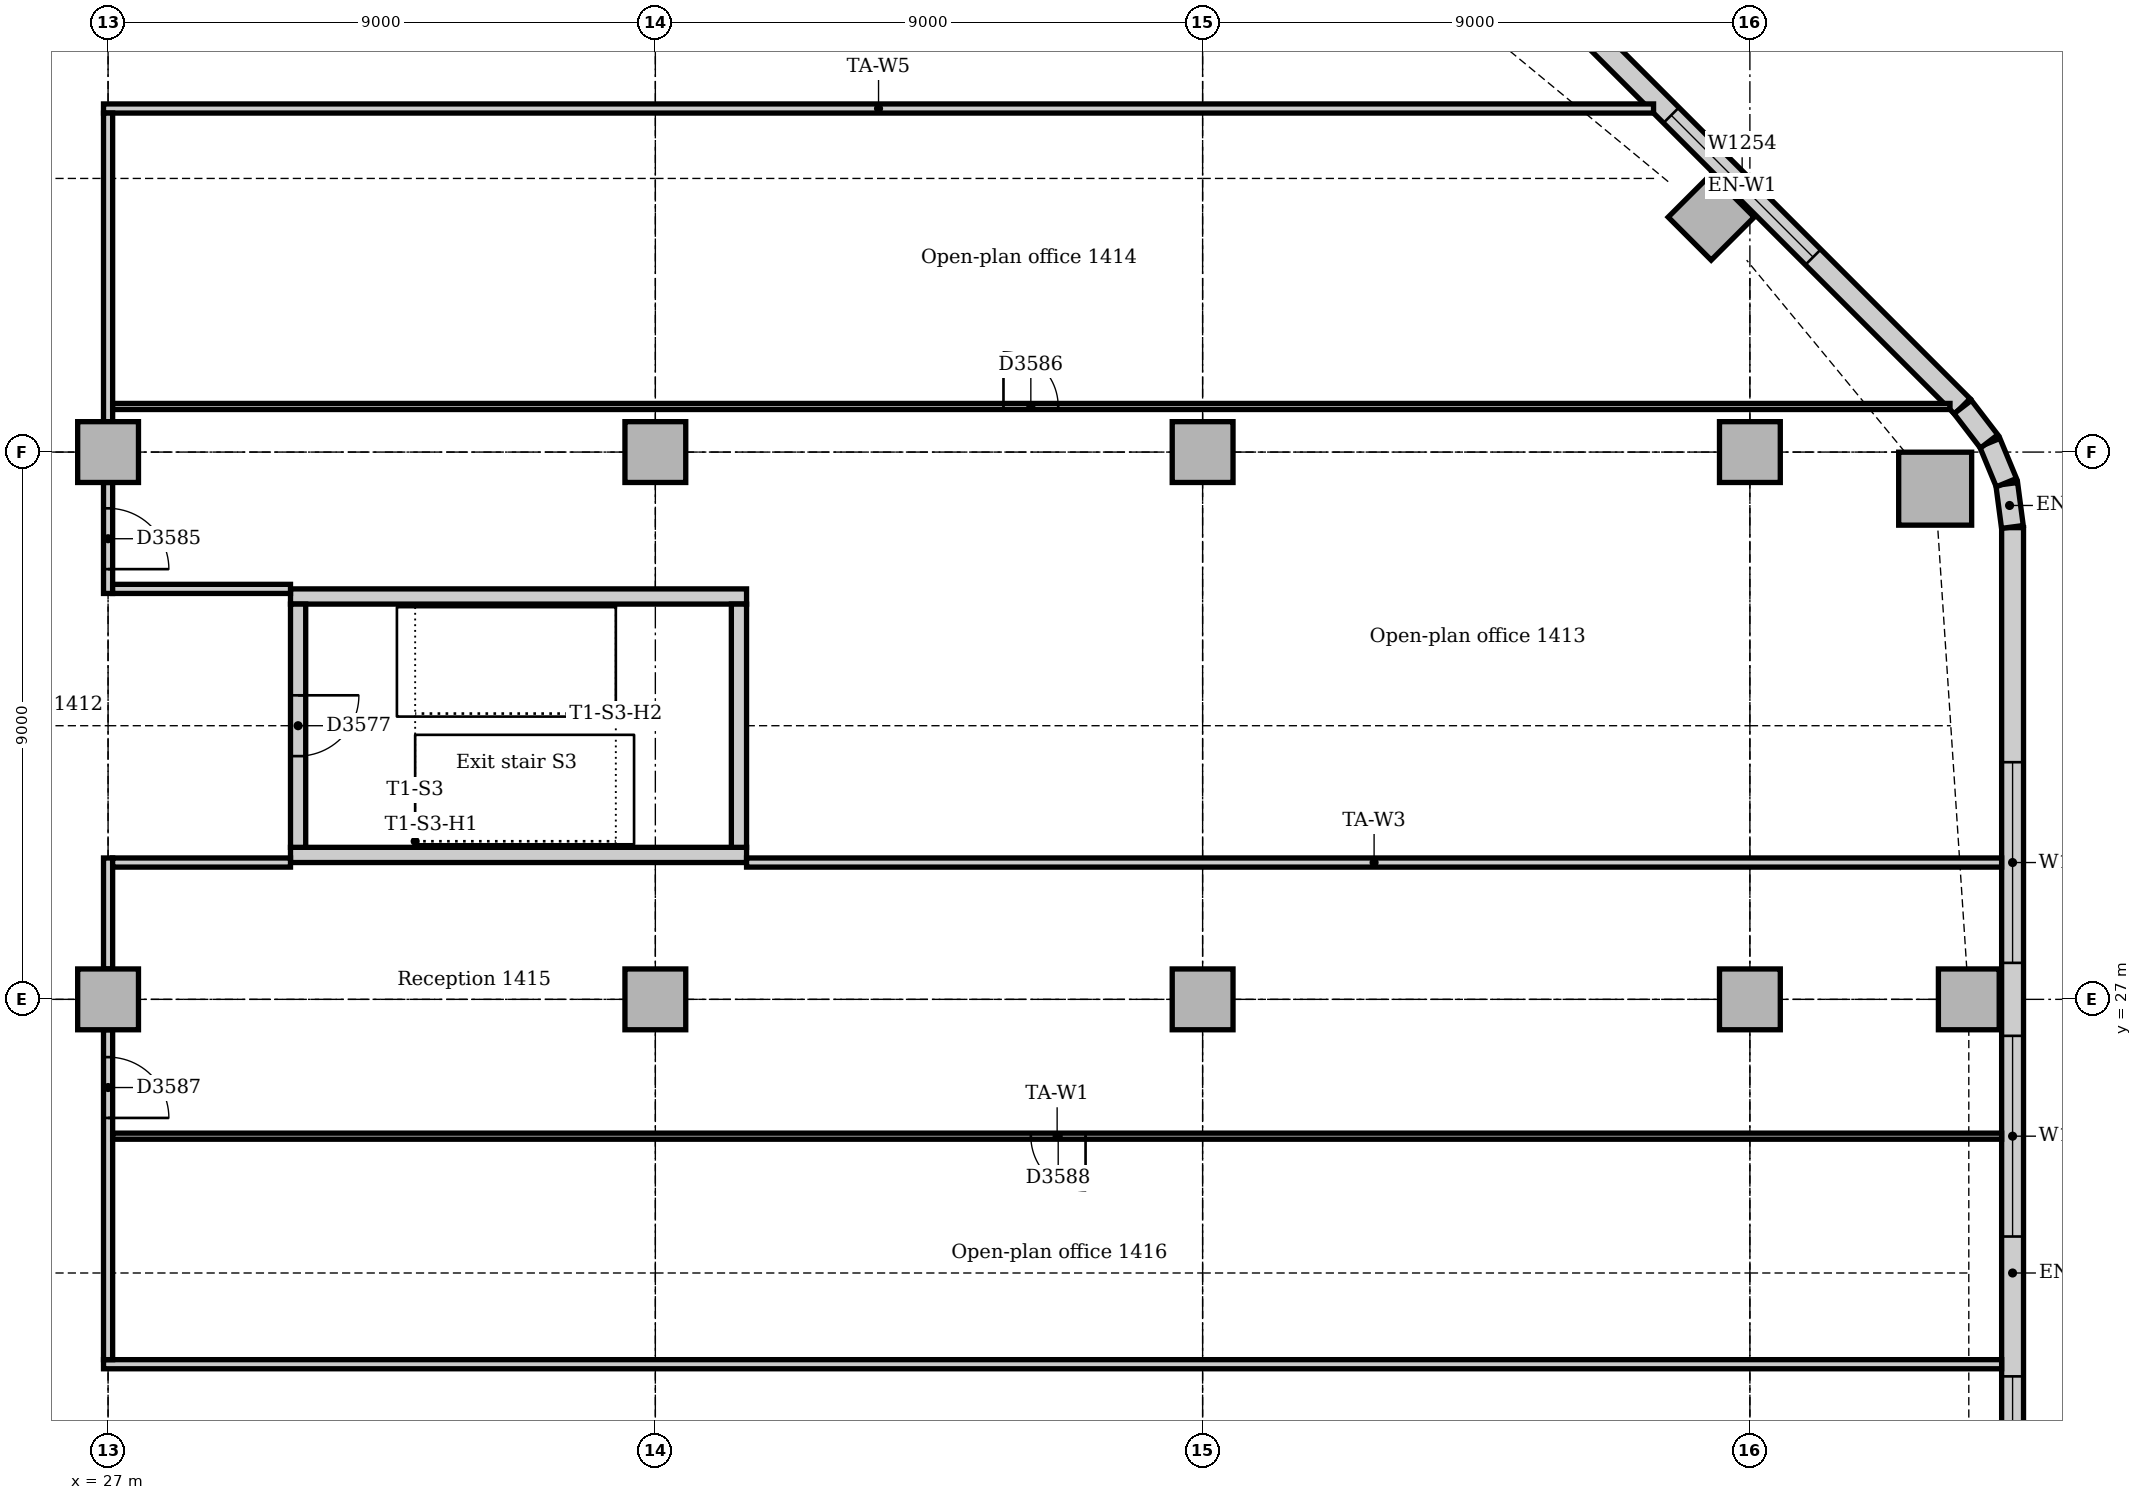
"""IFC4 building model, lengths in metres.
Left out: names, types, materials, properties, quantities, classifications, styles, units other than length and angle.
Written with IfcOpenShell. Run it as: python <this file> out.ifc"""

import sys

from ifc_helpers import new_model, si_unit, direction, frame, frame_2d, origin, origin_2d, place, context, subcontext, project, spatial, rectangle, extrude, element, fill, save


model = new_model("IFC4")
c1 = context("Model", 3, precision=1e-05, world=origin(), true_north=direction((0.0, 1.0)))
c2 = subcontext(c1, "Body", "Model", "MODEL_VIEW")
j1 = project(units=[si_unit("LENGTHUNIT", "METRE"), si_unit("PLANEANGLEUNIT", "RADIAN")], contexts=[c1])
p1 = place(None, origin())
s1 = spatial("IfcSite", under=j1, at=p1, CompositionType="ELEMENT")
p2 = place(p1, origin())
s2 = spatial("IfcBuilding", under=s1, at=p2, CompositionType="ELEMENT")
p3 = place(p2, frame((0.0, 0.0, 63.0)))
s3 = spatial("IfcBuildingStorey", under=s2, at=p3, CompositionType="ELEMENT", Elevation=63.0)
for number, where, z_axis, x_axis in (
    (1, (30.0, 29.375, 0.0), (0.0, 0.0, 1.0), (1.0, 0.0, 0.0)),
    (2, (37.5, 33.625, 0.0), (0.0, 0.0, 1.0), (-1.0, 0.0, 0.0)),
):
    element("IfcWall", number, at=place(p3, frame(where, z_axis=z_axis, x_axis=x_axis)), inside=s3, PredefinedType="SOLIDWALL", context=c2, shape_type="SweptSolid", body=[
        extrude(rectangle(XDim=7.5, YDim=0.25, at=frame_2d((3.75, 0.0))), origin(), (0.0, 0.0, 1.0), 4.0),
    ])
p4 = place(p3, frame((37.375, 29.5, 0.0), z_axis=(0.0, 0.0, 1.0), x_axis=(0.0, 1.0, 0.0)))
e3 = element("IfcWall", 3, at=p4, inside=s3, PredefinedType="SOLIDWALL", context=c2, shape_type="SweptSolid", body=[
    extrude(rectangle(XDim=4.0, YDim=0.25, at=frame_2d((2.0, 0.0))), origin(), (0.0, 0.0, 1.0), 4.0),
])
p5 = place(p3, frame((30.125, 33.5, 0.0), z_axis=(0.0, 0.0, 1.0), x_axis=(0.0, -1.0, 0.0)))
e4 = element("IfcWall", 4, at=p5, inside=s3, PredefinedType="SOLIDWALL", context=c2, shape_type="SweptSolid", body=[
    extrude(rectangle(XDim=4.0, YDim=0.25, at=frame_2d((2.0, 0.0))), origin(), (0.0, 0.0, 1.0), 4.0),
])
p6 = place(p5, frame((1.5, 0.0, 0.0)))
e5 = element("IfcOpeningElement", 5, at=p6, cuts=e4, PredefinedType="OPENING", context=c2, shape_type="SweptSolid", body=[
    extrude(rectangle(XDim=1.0, YDim=2.1, at=frame_2d((0.5, 1.05))), frame((0.0, 0.135, 0.0), z_axis=(0.0, -1.0, 0.0), x_axis=(1.0, 0.0, 0.0)), (0.0, 0.0, 1.0), 0.27),
])
p7 = place(p3, frame((57.047, 35.398, 0.0), z_axis=(0.0, 0.0, 1.0), x_axis=(1.0, 0.0, 0.0)))
e6 = element("IfcColumn", 6, at=p7, inside=s3, PredefinedType="COLUMN", context=c2, shape_type="SweptSolid", body=[
    extrude(rectangle(XDim=1.2, YDim=1.2, at=origin_2d()), origin(), (0.0, 0.0, 1.0), 3.85),
])
for number, where, z_axis, x_axis in (
    (7, (57.6, 27.0, 0.0), (0.0, 0.0, 1.0), (1.0, 0.0, 0.0)),
    (8, (53.364, 39.864, 0.0), (0.0, 0.0, 1.0), (0.707, 0.707, 0.0)),
    (9, (27.0, 27.0, 0.0), (0.0, 0.0, 1.0), (1.0, 0.0, 0.0)),
    (10, (27.0, 36.0, 0.0), (0.0, 0.0, 1.0), (1.0, 0.0, 0.0)),
    (11, (36.0, 27.0, 0.0), (0.0, 0.0, 1.0), (1.0, 0.0, 0.0)),
    (12, (36.0, 36.0, 0.0), (0.0, 0.0, 1.0), (1.0, 0.0, 0.0)),
    (13, (45.0, 27.0, 0.0), (0.0, 0.0, 1.0), (1.0, 0.0, 0.0)),
    (14, (45.0, 36.0, 0.0), (0.0, 0.0, 1.0), (1.0, 0.0, 0.0)),
    (15, (54.0, 27.0, 0.0), (0.0, 0.0, 1.0), (1.0, 0.0, 0.0)),
    (16, (54.0, 36.0, 0.0), (0.0, 0.0, 1.0), (1.0, 0.0, 0.0)),
):
    element("IfcColumn", number, at=place(p3, frame(where, z_axis=z_axis, x_axis=x_axis)), inside=s3, PredefinedType="COLUMN", context=c2, shape_type="SweptSolid", body=[
        extrude(rectangle(XDim=1.0, YDim=1.0, at=origin_2d()), origin(), (0.0, 0.0, 1.0), 3.85),
    ])
p8 = place(p3, frame((58.32, 10.243, 0.0), z_axis=(0.0, 0.0, 1.0), x_axis=(0.0, 1.0, 0.0)))
e17 = element("IfcWall", 17, at=p8, inside=s3, PredefinedType="STANDARD", context=c2, shape_type="SweptSolid", body=[
    extrude(rectangle(XDim=24.515, YDim=0.36, at=frame_2d((12.257, 0.0))), origin(), (0.0, 0.0, 1.0), 3.85),
])
p9 = place(p8, frame((3.857, 0.0, 0.9)))
e18 = element("IfcOpeningElement", 18, at=p9, cuts=e17, PredefinedType="OPENING", context=c2, shape_type="SweptSolid", body=[
    extrude(rectangle(XDim=3.3, YDim=1.6, at=frame_2d((1.65, 0.8))), frame((0.0, 0.19, 0.0), z_axis=(0.0, -1.0, 0.0), x_axis=(1.0, 0.0, 0.0)), (0.0, 0.0, 1.0), 0.38),
])
p10 = place(p8, frame((8.757, 0.0, 0.9)))
e19 = element("IfcOpeningElement", 19, at=p10, cuts=e17, PredefinedType="OPENING", context=c2, shape_type="SweptSolid", body=[
    extrude(rectangle(XDim=1.8, YDim=1.6, at=frame_2d((0.9, 0.8))), frame((0.0, 0.19, 0.0), z_axis=(0.0, -1.0, 0.0), x_axis=(1.0, 0.0, 0.0)), (0.0, 0.0, 1.0), 0.38),
])
p11 = place(p8, frame((12.857, 0.0, 0.9)))
e20 = element("IfcOpeningElement", 20, at=p11, cuts=e17, PredefinedType="OPENING", context=c2, shape_type="SweptSolid", body=[
    extrude(rectangle(XDim=3.3, YDim=1.6, at=frame_2d((1.65, 0.8))), frame((0.0, 0.19, 0.0), z_axis=(0.0, -1.0, 0.0), x_axis=(1.0, 0.0, 0.0)), (0.0, 0.0, 1.0), 0.38),
])
p12 = place(p8, frame((17.357, 0.0, 0.9)))
e21 = element("IfcOpeningElement", 21, at=p12, cuts=e17, PredefinedType="OPENING", context=c2, shape_type="SweptSolid", body=[
    extrude(rectangle(XDim=3.3, YDim=1.6, at=frame_2d((1.65, 0.8))), frame((0.0, 0.19, 0.0), z_axis=(0.0, -1.0, 0.0), x_axis=(1.0, 0.0, 0.0)), (0.0, 0.0, 1.0), 0.38),
])
p13 = place(p3, frame((57.494, 36.751, 0.0), z_axis=(0.0, 0.0, 1.0), x_axis=(-0.707106781187, 0.707106781187, 0.0)))
e22 = element("IfcWall", 22, at=p13, inside=s3, PredefinedType="STANDARD", context=c2, shape_type="SweptSolid", body=[
    extrude(rectangle(XDim=10.243, YDim=0.36, at=frame_2d((5.121, 0.0))), origin(), (0.0, 0.0, 1.0), 3.85),
])
p14 = place(p13, frame((3.471, 0.0, 0.9)))
e23 = element("IfcOpeningElement", 23, at=p14, cuts=e22, PredefinedType="OPENING", context=c2, shape_type="SweptSolid", body=[
    extrude(rectangle(XDim=3.3, YDim=1.6, at=frame_2d((1.65, 0.8))), frame((0.0, 0.19, 0.0), z_axis=(0.0, -1.0, 0.0), x_axis=(1.0, 0.0, 0.0)), (0.0, 0.0, 1.0), 0.38),
])
for number, where, z_axis, x_axis in (
    (24, (58.317, 34.769, 0.0), (0.0, 0.0, 1.0), (-0.131, 0.991, 0.0)),
    (25, (58.218, 35.497, 0.0), (0.0, 0.0, 1.0), (-0.383, 0.924, 0.0)),
):
    element("IfcWall", number, at=place(p3, frame(where, z_axis=z_axis, x_axis=x_axis)), inside=s3, PredefinedType="STANDARD", context=c2, shape_type="SweptSolid", body=[
        extrude(rectangle(XDim=0.713, YDim=0.36, at=frame_2d((0.356, 0.0))), origin(), (0.0, 0.0, 1.0), 3.85),
    ])
p15 = place(p3, frame((57.934, 36.175, 0.0), z_axis=(0.0, 0.0, 1.0), x_axis=(-0.608802368033, 0.793321924995, 0.0)))
e26 = element("IfcWall", 26, at=p15, inside=s3, PredefinedType="STANDARD", context=c2, shape_type="SweptSolid", body=[
    extrude(rectangle(XDim=0.713, YDim=0.36, at=frame_2d((0.357, 0.0))), origin(), (0.0, 0.0, 1.0), 3.85),
])
p16 = place(p3, frame((26.925, 21.0, 0.0), z_axis=(0.0, 0.0, 1.0), x_axis=(1.0, 0.0, 0.0)))
e27 = element("IfcWall", 27, at=p16, inside=s3, PredefinedType="PARTITIONING", context=c2, shape_type="SweptSolid", body=[
    extrude(rectangle(XDim=31.215, YDim=0.15, at=frame_2d((15.607, 0.0))), origin(), (0.0, 0.0, 1.0), 3.85),
])
p17 = place(p3, frame((26.925, 41.65, 0.0), z_axis=(0.0, 0.0, 1.0), x_axis=(1.0, 0.0, 0.0)))
e28 = element("IfcWall", 28, at=p17, inside=s3, PredefinedType="PARTITIONING", context=c2, shape_type="SweptSolid", body=[
    extrude(rectangle(XDim=25.491, YDim=0.15, at=frame_2d((12.745, 0.0))), origin(), (0.0, 0.0, 1.0), 3.85),
])
p18 = place(p3, frame((27.0, 21.075, 0.0), z_axis=(0.0, 0.0, 1.0), x_axis=(0.0, 1.0, 0.0)))
e29 = element("IfcWall", 29, at=p18, inside=s3, PredefinedType="PARTITIONING", context=c2, shape_type="SweptSolid", body=[
    extrude(rectangle(XDim=5.425, YDim=0.15, at=frame_2d((2.712, 0.0))), origin(), (0.0, 0.0, 1.0), 3.158),
])
p19 = place(p18, frame((3.975, 0.0, 0.0)))
e30 = element("IfcOpeningElement", 30, at=p19, cuts=e29, PredefinedType="OPENING", context=c2, shape_type="SweptSolid", body=[
    extrude(rectangle(XDim=1.0, YDim=2.1, at=frame_2d((0.5, 1.05))), frame((0.0, 0.085, 0.0), z_axis=(0.0, -1.0, 0.0), x_axis=(1.0, 0.0, 0.0)), (0.0, 0.0, 1.0), 0.17),
])
p20 = place(p3, frame((27.0, 27.5, 0.0), z_axis=(0.0, 0.0, 1.0), x_axis=(0.0, 1.0, 0.0)))
e31 = element("IfcWall", 31, at=p20, inside=s3, PredefinedType="PARTITIONING", context=c2, shape_type="SweptSolid", body=[
    extrude(rectangle(XDim=1.825, YDim=0.15, at=frame_2d((0.912, 0.0))), origin(), (0.0, 0.0, 1.0), 3.158),
])
p21 = place(p3, frame((27.0, 33.675, 0.0), z_axis=(0.0, 0.0, 1.0), x_axis=(0.0, 1.0, 0.0)))
e32 = element("IfcWall", 32, at=p21, inside=s3, PredefinedType="PARTITIONING", context=c2, shape_type="SweptSolid", body=[
    extrude(rectangle(XDim=1.825, YDim=0.15, at=frame_2d((0.912, 0.0))), origin(), (0.0, 0.0, 1.0), 3.158),
])
p22 = place(p21, frame((0.4, 0.0, 0.0)))
e33 = element("IfcOpeningElement", 33, at=p22, cuts=e32, PredefinedType="OPENING", context=c2, shape_type="SweptSolid", body=[
    extrude(rectangle(XDim=1.0, YDim=2.1, at=frame_2d((0.5, 1.05))), frame((0.0, 0.085, 0.0), z_axis=(0.0, -1.0, 0.0), x_axis=(1.0, 0.0, 0.0)), (0.0, 0.0, 1.0), 0.17),
])
p23 = place(p3, frame((27.0, 36.5, 0.0), z_axis=(0.0, 0.0, 1.0), x_axis=(0.0, 1.0, 0.0)))
e34 = element("IfcWall", 34, at=p23, inside=s3, PredefinedType="PARTITIONING", context=c2, shape_type="SweptSolid", body=[
    extrude(rectangle(XDim=5.075, YDim=0.15, at=frame_2d((2.538, 0.0))), origin(), (0.0, 0.0, 1.0), 3.158),
])
for number, where, z_axis, x_axis in (
    (35, (27.075, 29.25, 0.0), (0.0, 0.0, 1.0), (1.0, 0.0, 0.0)),
    (36, (27.075, 33.75, 0.0), (0.0, 0.0, 1.0), (1.0, 0.0, 0.0)),
):
    element("IfcWall", number, at=place(p3, frame(where, z_axis=z_axis, x_axis=x_axis)), inside=s3, PredefinedType="PARTITIONING", context=c2, shape_type="SweptSolid", body=[
        extrude(rectangle(XDim=2.925, YDim=0.15, at=frame_2d((1.462, 0.0))), origin(), (0.0, 0.0, 1.0), 3.85),
    ])
p24 = place(p3, frame((37.5, 29.25, 0.0), z_axis=(0.0, 0.0, 1.0), x_axis=(1.0, 0.0, 0.0)))
e37 = element("IfcWall", 37, at=p24, inside=s3, PredefinedType="PARTITIONING", context=c2, shape_type="SweptSolid", body=[
    extrude(rectangle(XDim=20.64, YDim=0.15, at=frame_2d((10.32, 0.0))), origin(), (0.0, 0.0, 1.0), 3.85),
])
p25 = place(p3, frame((27.075, 24.75, 0.0), z_axis=(0.0, 0.0, 1.0), x_axis=(1.0, 0.0, 0.0)))
e38 = element("IfcWall", 38, at=p25, inside=s3, PredefinedType="PARTITIONING", context=c2, shape_type="SweptSolid", body=[
    extrude(rectangle(XDim=31.065, YDim=0.1, at=frame_2d((15.533, 0.0))), origin(), (0.0, 0.0, 1.0), 3.85),
])
p26 = place(p25, frame((15.1, 0.0, 0.0)))
e39 = element("IfcOpeningElement", 39, at=p26, cuts=e38, PredefinedType="OPENING", context=c2, shape_type="SweptSolid", body=[
    extrude(rectangle(XDim=0.9, YDim=2.1, at=frame_2d((0.45, 1.05))), frame((0.0, 0.06, 0.0), z_axis=(0.0, -1.0, 0.0), x_axis=(1.0, 0.0, 0.0)), (0.0, 0.0, 1.0), 0.12),
])
p27 = place(p3, frame((27.075, 36.75, 0.0), z_axis=(0.0, 0.0, 1.0), x_axis=(1.0, 0.0, 0.0)))
e40 = element("IfcWall", 40, at=p27, inside=s3, PredefinedType="PARTITIONING", context=c2, shape_type="SweptSolid", body=[
    extrude(rectangle(XDim=30.216, YDim=0.1, at=frame_2d((15.108, 0.0))), origin(), (0.0, 0.0, 1.0), 3.85),
])
p28 = place(p27, frame((14.65, 0.0, 0.0)))
e41 = element("IfcOpeningElement", 41, at=p28, cuts=e40, PredefinedType="OPENING", context=c2, shape_type="SweptSolid", body=[
    extrude(rectangle(XDim=0.9, YDim=2.1, at=frame_2d((0.45, 1.05))), frame((0.0, 0.06, 0.0), z_axis=(0.0, -1.0, 0.0), x_axis=(1.0, 0.0, 0.0)), (0.0, 0.0, 1.0), 0.12),
])
p29 = place(p10, origin())
e42 = element("IfcWindow", 42, at=p29, inside=s3, PartitioningType="SINGLE_PANEL", PredefinedType="WINDOW", context=c2, shape_type="SweptSolid", body=[
    extrude(rectangle(XDim=1.8, YDim=1.6, at=frame_2d((0.9, 0.8))), frame((0.0, 0.13, 0.0), z_axis=(0.0, -1.0, 0.0), x_axis=(1.0, 0.0, 0.0)), (0.0, 0.0, 1.0), 0.06),
])
fill(e19, e42)
p30 = place(p11, origin())
e43 = element("IfcWindow", 43, at=p30, inside=s3, PartitioningType="SINGLE_PANEL", PredefinedType="WINDOW", context=c2, shape_type="SweptSolid", body=[
    extrude(rectangle(XDim=3.3, YDim=1.6, at=frame_2d((1.65, 0.8))), frame((0.0, 0.13, 0.0), z_axis=(0.0, -1.0, 0.0), x_axis=(1.0, 0.0, 0.0)), (0.0, 0.0, 1.0), 0.06),
])
fill(e20, e43)
p31 = place(p12, origin())
e44 = element("IfcWindow", 44, at=p31, inside=s3, PartitioningType="SINGLE_PANEL", PredefinedType="WINDOW", context=c2, shape_type="SweptSolid", body=[
    extrude(rectangle(XDim=3.3, YDim=1.6, at=frame_2d((1.65, 0.8))), frame((0.0, 0.13, 0.0), z_axis=(0.0, -1.0, 0.0), x_axis=(1.0, 0.0, 0.0)), (0.0, 0.0, 1.0), 0.06),
])
fill(e21, e44)
p32 = place(p14, origin())
e45 = element("IfcWindow", 45, at=p32, inside=s3, PartitioningType="SINGLE_PANEL", PredefinedType="WINDOW", context=c2, shape_type="SweptSolid", body=[
    extrude(rectangle(XDim=3.3, YDim=1.6, at=frame_2d((1.65, 0.8))), frame((0.0, 0.13, 0.0), z_axis=(0.0, -1.0, 0.0), x_axis=(1.0, 0.0, 0.0)), (0.0, 0.0, 1.0), 0.06),
])
fill(e23, e45)
p33 = place(p6, origin())
e46 = element("IfcDoor", 46, at=p33, inside=s3, OperationType="SINGLE_SWING_LEFT", PredefinedType="DOOR", context=c2, shape_type="SweptSolid", body=[
    extrude(rectangle(XDim=1.0, YDim=2.1, at=frame_2d((0.5, 1.05))), frame((0.0, 0.025, 0.0), z_axis=(0.0, -1.0, 0.0), x_axis=(1.0, 0.0, 0.0)), (0.0, 0.0, 1.0), 0.05),
])
fill(e5, e46)
p34 = place(p22, frame((1.0, 0.0, 0.0), z_axis=(0.0, 0.0, 1.0), x_axis=(-1.0, 0.0, 0.0)))
e47 = element("IfcDoor", 47, at=p34, inside=s3, OperationType="SINGLE_SWING_RIGHT", PredefinedType="DOOR", context=c2, shape_type="SweptSolid", body=[
    extrude(rectangle(XDim=1.0, YDim=2.1, at=frame_2d((0.5, 1.05))), frame((0.0, 0.025, 0.0), z_axis=(0.0, -1.0, 0.0), x_axis=(1.0, 0.0, 0.0)), (0.0, 0.0, 1.0), 0.05),
])
fill(e33, e47)
p35 = place(p28, origin())
e48 = element("IfcDoor", 48, at=p35, inside=s3, OperationType="SINGLE_SWING_LEFT", PredefinedType="DOOR", context=c2, shape_type="SweptSolid", body=[
    extrude(rectangle(XDim=0.9, YDim=2.1, at=frame_2d((0.45, 1.05))), frame((0.0, 0.025, 0.0), z_axis=(0.0, -1.0, 0.0), x_axis=(1.0, 0.0, 0.0)), (0.0, 0.0, 1.0), 0.05),
])
fill(e41, e48)
p36 = place(p19, frame((1.0, 0.0, 0.0), z_axis=(0.0, 0.0, 1.0), x_axis=(-1.0, 0.0, 0.0)))
e49 = element("IfcDoor", 49, at=p36, inside=s3, OperationType="SINGLE_SWING_RIGHT", PredefinedType="DOOR", context=c2, shape_type="SweptSolid", body=[
    extrude(rectangle(XDim=1.0, YDim=2.1, at=frame_2d((0.5, 1.05))), frame((0.0, 0.025, 0.0), z_axis=(0.0, -1.0, 0.0), x_axis=(1.0, 0.0, 0.0)), (0.0, 0.0, 1.0), 0.05),
])
fill(e30, e49)
p37 = place(p26, frame((0.9, 0.0, 0.0), z_axis=(0.0, 0.0, 1.0), x_axis=(-1.0, 0.0, 0.0)))
e50 = element("IfcDoor", 50, at=p37, inside=s3, OperationType="SINGLE_SWING_LEFT", PredefinedType="DOOR", context=c2, shape_type="SweptSolid", body=[
    extrude(rectangle(XDim=0.9, YDim=2.1, at=frame_2d((0.45, 1.05))), frame((0.0, 0.025, 0.0), z_axis=(0.0, -1.0, 0.0), x_axis=(1.0, 0.0, 0.0)), (0.0, 0.0, 1.0), 0.05),
])
fill(e39, e50)
save(model, sys.argv[1])
